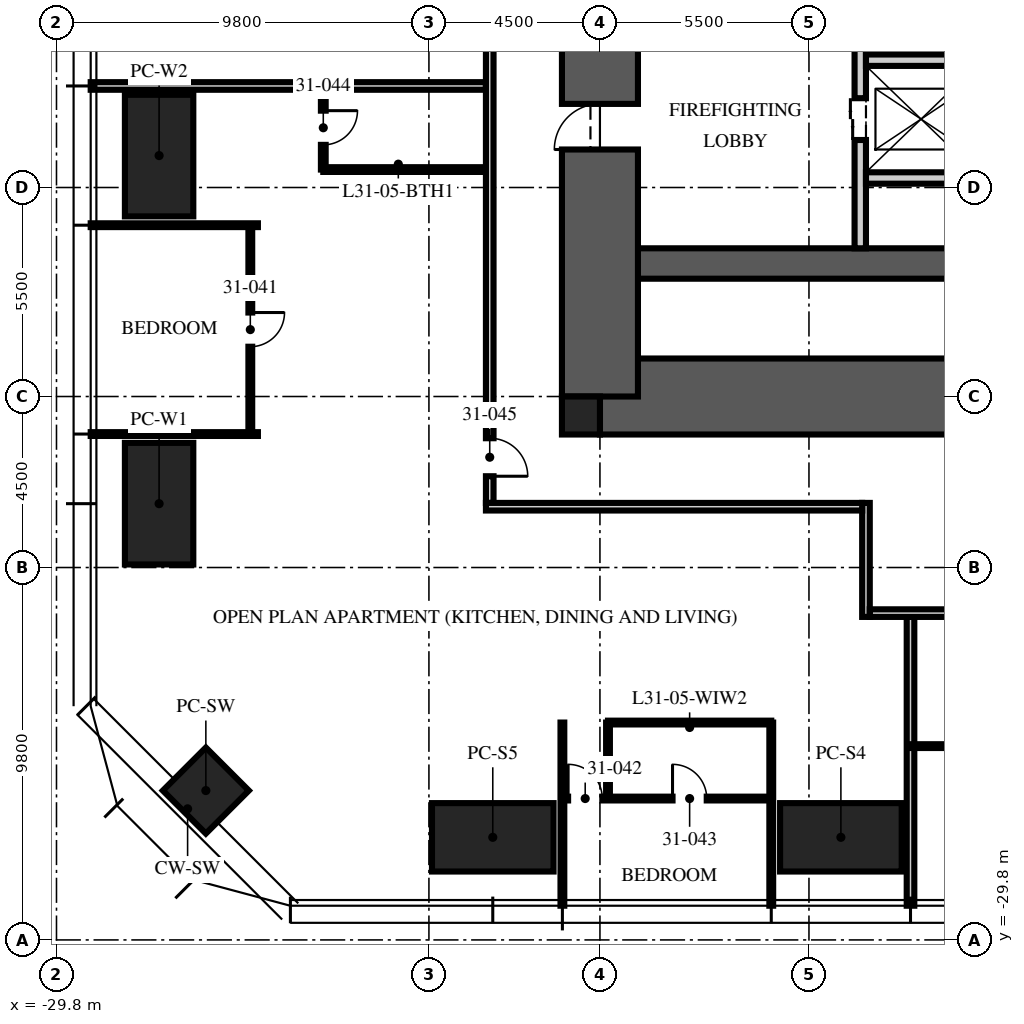
"""IFC4 building model, lengths in metres.
Left out: names, types, materials, properties, quantities, classifications, styles, units other than length and angle.
Written with IfcOpenShell. Run it as: python <this file> out.ifc"""

import sys

from ifc_helpers import new_model, si_unit, direction, frame, frame_2d, origin, origin_2d, place, context, subcontext, project, spatial, rectangle, extrude, element, fill, save


model = new_model("IFC4")
c1 = context("Model", 3, precision=1e-05, world=origin(), true_north=direction((0.0, 1.0)))
c2 = subcontext(c1, "Body", "Model", "MODEL_VIEW")
j1 = project(units=[si_unit("LENGTHUNIT", "METRE"), si_unit("PLANEANGLEUNIT", "RADIAN")], contexts=[c1])
p1 = place(None, origin())
s1 = spatial("IfcSite", under=j1, at=p1, CompositionType="ELEMENT")
p2 = place(p1, origin())
s2 = spatial("IfcBuilding", under=s1, at=p2, CompositionType="ELEMENT")
p3 = place(p2, frame((0.0, 0.0, 126.0)))
s3 = spatial("IfcBuildingStorey", under=s2, at=p3, CompositionType="ELEMENT", Elevation=126.0)
p4 = place(p3, frame((-15.5, -15.5, -0.25), z_axis=(0.0, 0.0, 1.0), x_axis=(1.0, 0.0, 0.0)))
e1 = element("IfcWall", 1, at=p4, inside=s3, PredefinedType="SHEAR", context=c2, shape_type="SweptSolid", body=[
    extrude(rectangle(XDim=31.0, YDim=2.0, at=frame_2d((15.5, 0.0))), origin(), (0.0, 0.0, 1.0), 3.75),
])
p5 = place(p4, frame((10.4, 0.0, 0.25)))
e2 = element("IfcOpeningElement", 2, at=p5, cuts=e1, PredefinedType="OPENING", context=c2, shape_type="SweptSolid", body=[
    extrude(rectangle(XDim=1.1, YDim=2.1, at=frame_2d((0.55, 1.05))), frame((0.0, 1.01, 0.0), z_axis=(0.0, -1.0, 0.0), x_axis=(1.0, 0.0, 0.0)), (0.0, 0.0, 1.0), 2.02),
])
p6 = place(p4, frame((13.5, 0.0, 0.25)))
e3 = element("IfcOpeningElement", 3, at=p6, cuts=e1, PredefinedType="OPENING", context=c2, shape_type="SweptSolid", body=[
    extrude(rectangle(XDim=1.1, YDim=2.1, at=frame_2d((0.55, 1.05))), frame((0.0, 1.01, 0.0), z_axis=(0.0, -1.0, 0.0), x_axis=(1.0, 0.0, 0.0)), (0.0, 0.0, 1.0), 2.02),
])
p7 = place(p4, frame((16.6, 0.0, 0.25)))
e4 = element("IfcOpeningElement", 4, at=p7, cuts=e1, PredefinedType="OPENING", context=c2, shape_type="SweptSolid", body=[
    extrude(rectangle(XDim=1.1, YDim=2.1, at=frame_2d((0.55, 1.05))), frame((0.0, 1.01, 0.0), z_axis=(0.0, -1.0, 0.0), x_axis=(1.0, 0.0, 0.0)), (0.0, 0.0, 1.0), 2.02),
])
p8 = place(p3, frame((-15.5, -12.0, -0.25), z_axis=(0.0, 0.0, 1.0), x_axis=(1.0, 0.0, 0.0)))
e5 = element("IfcWall", 5, at=p8, inside=s3, PredefinedType="SHEAR", context=c2, shape_type="SweptSolid", body=[
    extrude(rectangle(XDim=31.0, YDim=0.8, at=frame_2d((15.5, 0.0))), origin(), (0.0, 0.0, 1.0), 3.75),
])
p9 = place(p3, frame((-15.5, -15.5, -0.25), z_axis=(0.0, 0.0, 1.0), x_axis=(0.0, 1.0, 0.0)))
e6 = element("IfcWall", 6, at=p9, inside=s3, PredefinedType="SHEAR", context=c2, shape_type="SweptSolid", body=[
    extrude(rectangle(XDim=31.0, YDim=2.0, at=frame_2d((15.5, 0.0))), origin(), (0.0, 0.0, 1.0), 3.75),
])
p10 = place(p9, frame((6.5, 0.0, 0.25)))
e7 = element("IfcOpeningElement", 7, at=p10, cuts=e6, PredefinedType="OPENING", context=c2, shape_type="SweptSolid", body=[
    extrude(rectangle(XDim=1.2, YDim=2.1, at=frame_2d((0.6, 1.05))), frame((0.0, 1.01, 0.0), z_axis=(0.0, -1.0, 0.0), x_axis=(1.0, 0.0, 0.0)), (0.0, 0.0, 1.0), 2.02),
])
p11 = place(p9, frame((23.0, 0.0, 0.25)))
e8 = element("IfcOpeningElement", 8, at=p11, cuts=e6, PredefinedType="OPENING", context=c2, shape_type="SweptSolid", body=[
    extrude(rectangle(XDim=1.8, YDim=2.1, at=frame_2d((0.9, 1.05))), frame((0.0, 1.01, 0.0), z_axis=(0.0, -1.0, 0.0), x_axis=(1.0, 0.0, 0.0)), (0.0, 0.0, 1.0), 2.02),
])
p12 = place(p3, frame((-16.0, -16.0, -0.25), z_axis=(0.0, 0.0, 1.0), x_axis=(1.0, 0.0, 0.0)))
e9 = element("IfcColumn", 9, at=p12, inside=s3, PredefinedType="COLUMN", context=c2, shape_type="SweptSolid", body=[
    extrude(rectangle(XDim=1.0, YDim=1.0, at=origin_2d()), origin(), (0.0, 0.0, 1.0), 3.75),
])
for number, where, z_axis, x_axis in (
    (10, (-9.16, -27.1, 0.0), (0.0, 0.0, 1.0), (1.0, 0.0, 0.0)),
    (11, (-18.32, -27.1, 0.0), (0.0, 0.0, 1.0), (1.0, 0.0, 0.0)),
    (12, (-27.1, -18.32, 0.0), (0.0, 0.0, 1.0), (0.0, 1.0, 0.0)),
    (13, (-27.1, -9.16, 0.0), (0.0, 0.0, 1.0), (0.0, 1.0, 0.0)),
):
    element("IfcColumn", number, at=place(p3, frame(where, z_axis=z_axis, x_axis=x_axis)), inside=s3, PredefinedType="COLUMN", context=c2, shape_type="SweptSolid", body=[
        extrude(rectangle(XDim=3.2, YDim=1.8, at=origin_2d()), origin(), (0.0, 0.0, 1.0), 3.75),
    ])
p13 = place(p3, frame((-25.87, -25.87, 0.0), z_axis=(0.0, 0.0, 1.0), x_axis=(0.707106781187, -0.707106781187, 0.0)))
e14 = element("IfcColumn", 14, at=p13, inside=s3, PredefinedType="COLUMN", context=c2, shape_type="SweptSolid", body=[
    extrude(rectangle(XDim=1.6, YDim=1.6, at=origin_2d()), origin(), (0.0, 0.0, 1.0), 3.75),
])
p14 = place(p3, frame((-8.65, -11.6, 0.0), z_axis=(0.0, 0.0, 1.0), x_axis=(0.0, 1.0, 0.0)))
e15 = element("IfcWall", 15, at=p14, inside=s3, PredefinedType="PARTITIONING", context=c2, shape_type="SweptSolid", body=[
    extrude(rectangle(XDim=6.7, YDim=0.3, at=frame_2d((3.35, 0.0))), origin(), (0.0, 0.0, 1.0), 3.5),
])
p15 = place(p14, frame((2.85, 0.0, 0.0)))
e16 = element("IfcOpeningElement", 16, at=p15, cuts=e15, PredefinedType="OPENING", context=c2, shape_type="SweptSolid", body=[
    extrude(rectangle(XDim=1.1, YDim=2.1, at=frame_2d((0.55, 1.05))), frame((0.0, 0.16, 0.0), z_axis=(0.0, -1.0, 0.0), x_axis=(1.0, 0.0, 0.0)), (0.0, 0.0, 1.0), 0.32),
])
p16 = place(p3, frame((-8.5, -6.65, 0.0), z_axis=(0.0, 0.0, 1.0), x_axis=(1.0, 0.0, 0.0)))
e17 = element("IfcWall", 17, at=p16, inside=s3, PredefinedType="PARTITIONING", context=c2, shape_type="SweptSolid", body=[
    extrude(rectangle(XDim=17.0, YDim=0.3, at=frame_2d((8.5, 0.0))), origin(), (0.0, 0.0, 1.0), 3.5),
])
p17 = place(p16, frame((7.8, 0.0, 0.0)))
e18 = element("IfcOpeningElement", 18, at=p17, cuts=e17, PredefinedType="OPENING", context=c2, shape_type="SweptSolid", body=[
    extrude(rectangle(XDim=1.3, YDim=2.4, at=frame_2d((0.65, 1.2))), frame((0.0, 0.16, 0.0), z_axis=(0.0, -1.0, 0.0), x_axis=(1.0, 0.0, 0.0)), (0.0, 0.0, 1.0), 0.32),
])
p18 = place(p16, frame((5.65, 0.0, 0.0)))
e19 = element("IfcOpeningElement", 19, at=p18, cuts=e17, PredefinedType="OPENING", context=c2, shape_type="SweptSolid", body=[
    extrude(rectangle(XDim=0.9, YDim=2.1, at=frame_2d((0.45, 1.05))), frame((0.0, 0.16, 0.0), z_axis=(0.0, -1.0, 0.0), x_axis=(1.0, 0.0, 0.0)), (0.0, 0.0, 1.0), 0.32),
])
p19 = place(p16, frame((10.4, 0.0, 0.0)))
e20 = element("IfcOpeningElement", 20, at=p19, cuts=e17, PredefinedType="OPENING", context=c2, shape_type="SweptSolid", body=[
    extrude(rectangle(XDim=0.9, YDim=2.1, at=frame_2d((0.45, 1.05))), frame((0.0, 0.16, 0.0), z_axis=(0.0, -1.0, 0.0), x_axis=(1.0, 0.0, 0.0)), (0.0, 0.0, 1.0), 0.32),
])
p20 = place(p3, frame((-8.5, -9.75, 0.0), z_axis=(0.0, 0.0, 1.0), x_axis=(1.0, 0.0, 0.0)))
e21 = element("IfcWall", 21, at=p20, inside=s3, PredefinedType="PARTITIONING", context=c2, shape_type="SweptSolid", body=[
    extrude(rectangle(XDim=2.9, YDim=0.3, at=frame_2d((1.45, 0.0))), origin(), (0.0, 0.0, 1.0), 3.5),
])
p21 = place(p3, frame((-18.5, -7.328, 0.0), z_axis=(0.0, 0.0, 1.0), x_axis=(-1.0, 0.0, 0.0)))
e22 = element("IfcWall", 22, at=p21, inside=s3, PredefinedType="PARTITIONING", context=c2, shape_type="SweptSolid", body=[
    extrude(rectangle(XDim=10.4, YDim=0.2, at=frame_2d((5.2, 0.0))), origin(), (0.0, 0.0, 1.0), 2.81),
])
for number, where, z_axis, x_axis in (
    (23, (-24.5, -10.992, 0.0), (0.0, 0.0, 1.0), (-1.0, 0.0, 0.0)),
    (24, (-24.5, -16.488, 0.0), (0.0, 0.0, 1.0), (-1.0, 0.0, 0.0)),
):
    element("IfcWall", number, at=place(p3, frame(where, z_axis=z_axis, x_axis=x_axis)), inside=s3, PredefinedType="PARTITIONING", context=c2, shape_type="SweptSolid", body=[
        extrude(rectangle(XDim=4.4, YDim=0.1, at=frame_2d((2.2, 0.0))), origin(), (0.0, 0.0, 1.0), 2.81),
    ])
for number, where, z_axis, x_axis in (
    (25, (-16.488, -24.08, 0.0), (0.0, 0.0, 1.0), (0.0, -1.0, 0.0)),
    (26, (-10.992, -24.08, 0.0), (0.0, 0.0, 1.0), (0.0, -1.0, 0.0)),
):
    element("IfcWall", number, at=place(p3, frame(where, z_axis=z_axis, x_axis=x_axis)), inside=s3, PredefinedType="PARTITIONING", context=c2, shape_type="SweptSolid", body=[
        extrude(rectangle(XDim=4.82, YDim=0.1, at=frame_2d((2.41, 0.0))), origin(), (0.0, 0.0, 1.0), 2.81),
    ])
p22 = place(p3, frame((-7.328, -21.3, 0.0), z_axis=(0.0, 0.0, 1.0), x_axis=(0.0, -1.0, 0.0)))
e27 = element("IfcWall", 27, at=p22, inside=s3, PredefinedType="PARTITIONING", context=c2, shape_type="SweptSolid", body=[
    extrude(rectangle(XDim=7.6, YDim=0.2, at=frame_2d((3.8, 0.0))), origin(), (0.0, 0.0, 1.0), 2.81),
])
p23 = place(p3, frame((-24.7, -10.992, 0.0), z_axis=(0.0, 0.0, 1.0), x_axis=(0.0, -1.0, 0.0)))
e28 = element("IfcWall", 28, at=p23, inside=s3, PredefinedType="PARTITIONING", context=c2, shape_type="SweptSolid", body=[
    extrude(rectangle(XDim=5.496, YDim=0.1, at=frame_2d((2.748, 0.0))), origin(), (0.0, 0.0, 1.0), 2.81),
])
p24 = place(p23, frame((2.298, 0.0, 0.0)))
e29 = element("IfcOpeningElement", 29, at=p24, cuts=e28, PredefinedType="OPENING", context=c2, shape_type="SweptSolid", body=[
    extrude(rectangle(XDim=0.9, YDim=2.1, at=frame_2d((0.45, 1.05))), frame((0.0, 0.06, 0.0), z_axis=(0.0, -1.0, 0.0), x_axis=(1.0, 0.0, 0.0)), (0.0, 0.0, 1.0), 0.12),
])
p25 = place(p3, frame((-16.488, -26.08, 0.0), z_axis=(0.0, 0.0, 1.0), x_axis=(1.0, 0.0, 0.0)))
e30 = element("IfcWall", 30, at=p25, inside=s3, PredefinedType="PARTITIONING", context=c2, shape_type="SweptSolid", body=[
    extrude(rectangle(XDim=5.496, YDim=0.1, at=frame_2d((2.748, 0.0))), origin(), (0.0, 0.0, 1.0), 2.81),
])
p26 = place(p25, frame((0.15, 0.0, 0.0)))
e31 = element("IfcOpeningElement", 31, at=p26, cuts=e30, PredefinedType="OPENING", context=c2, shape_type="SweptSolid", body=[
    extrude(rectangle(XDim=0.9, YDim=2.1, at=frame_2d((0.45, 1.05))), frame((0.0, 0.06, 0.0), z_axis=(0.0, -1.0, 0.0), x_axis=(1.0, 0.0, 0.0)), (0.0, 0.0, 1.0), 0.12),
])
p27 = place(p25, frame((2.898, 0.0, 0.0)))
e32 = element("IfcOpeningElement", 32, at=p27, cuts=e30, PredefinedType="OPENING", context=c2, shape_type="SweptSolid", body=[
    extrude(rectangle(XDim=0.9, YDim=2.1, at=frame_2d((0.45, 1.05))), frame((0.0, 0.06, 0.0), z_axis=(0.0, -1.0, 0.0), x_axis=(1.0, 0.0, 0.0)), (0.0, 0.0, 1.0), 0.12),
])
p28 = place(p3, frame((-15.288, -24.08, 0.0), z_axis=(0.0, 0.0, 1.0), x_axis=(0.0, -1.0, 0.0)))
e33 = element("IfcWall", 33, at=p28, inside=s3, PredefinedType="PARTITIONING", context=c2, shape_type="SweptSolid", body=[
    extrude(rectangle(XDim=2.0, YDim=0.1, at=frame_2d((1.0, 0.0))), origin(), (0.0, 0.0, 1.0), 3.5),
])
p29 = place(p3, frame((-15.288, -24.08, 0.0), z_axis=(0.0, 0.0, 1.0), x_axis=(1.0, 0.0, 0.0)))
e34 = element("IfcWall", 34, at=p29, inside=s3, PredefinedType="PARTITIONING", context=c2, shape_type="SweptSolid", body=[
    extrude(rectangle(XDim=4.296, YDim=0.1, at=frame_2d((2.148, 0.0))), origin(), (0.0, 0.0, 1.0), 2.81),
])
p30 = place(p3, frame((-22.78, -7.328, 0.0), z_axis=(0.0, 0.0, 1.0), x_axis=(0.0, -1.0, 0.0)))
e35 = element("IfcWall", 35, at=p30, inside=s3, PredefinedType="PARTITIONING", context=c2, shape_type="SweptSolid", body=[
    extrude(rectangle(XDim=2.2, YDim=0.125, at=frame_2d((1.1, 0.0))), origin(), (0.0, 0.0, 1.0), 2.7),
])
p31 = place(p30, frame((0.65, 0.0, 0.0)))
e36 = element("IfcOpeningElement", 36, at=p31, cuts=e35, PredefinedType="OPENING", context=c2, shape_type="SweptSolid", body=[
    extrude(rectangle(XDim=0.9, YDim=2.1, at=frame_2d((0.45, 1.05))), frame((0.0, 0.073, 0.0), z_axis=(0.0, -1.0, 0.0), x_axis=(1.0, 0.0, 0.0)), (0.0, 0.0, 1.0), 0.145),
])
p32 = place(p3, frame((-18.5, -9.528, 0.0), z_axis=(0.0, 0.0, 1.0), x_axis=(-1.0, 0.0, 0.0)))
e37 = element("IfcWall", 37, at=p32, inside=s3, PredefinedType="PARTITIONING", context=c2, shape_type="SweptSolid", body=[
    extrude(rectangle(XDim=4.28, YDim=0.125, at=frame_2d((2.14, 0.0))), origin(), (0.0, 0.0, 1.0), 3.5),
])
p33 = place(p3, frame((-7.328, -24.7, 0.0), z_axis=(0.0, 0.0, 1.0), x_axis=(1.0, 0.0, 0.0)))
e38 = element("IfcWall", 38, at=p33, inside=s3, PredefinedType="PARTITIONING", context=c2, shape_type="SweptSolid", body=[
    extrude(rectangle(XDim=5.496, YDim=0.1, at=frame_2d((2.748, 0.0))), origin(), (0.0, 0.0, 1.0), 2.81),
])
p34 = place(p33, frame((2.298, 0.0, 0.0)))
e39 = element("IfcOpeningElement", 39, at=p34, cuts=e38, PredefinedType="OPENING", context=c2, shape_type="SweptSolid", body=[
    extrude(rectangle(XDim=0.9, YDim=2.1, at=frame_2d((0.45, 1.05))), frame((0.0, 0.06, 0.0), z_axis=(0.0, -1.0, 0.0), x_axis=(1.0, 0.0, 0.0)), (0.0, 0.0, 1.0), 0.12),
])
p35 = place(p3, frame((-18.4, 5.328, 0.0), z_axis=(0.0, 0.0, 1.0), x_axis=(0.0, -1.0, 0.0)))
e40 = element("IfcWall", 40, at=p35, inside=s3, PredefinedType="PARTITIONING", context=c2, shape_type="SweptSolid", body=[
    extrude(rectangle(XDim=23.628, YDim=0.2, at=frame_2d((11.814, 0.0))), origin(), (0.0, 0.0, 1.0), 2.3),
])
p36 = place(p35, frame((21.926, 0.0, 0.0)))
e41 = element("IfcOpeningElement", 41, at=p36, cuts=e40, PredefinedType="OPENING", context=c2, shape_type="SweptSolid", body=[
    extrude(rectangle(XDim=1.0, YDim=2.2, at=frame_2d((0.5, 1.1))), frame((0.0, 0.11, 0.0), z_axis=(0.0, -1.0, 0.0), x_axis=(1.0, 0.0, 0.0)), (0.0, 0.0, 1.0), 0.22),
])
p37 = place(p3, frame((-8.5, -18.3, 0.0), z_axis=(0.0, 0.0, 1.0), x_axis=(0.0, -1.0, 0.0)))
e42 = element("IfcWall", 42, at=p37, inside=s3, PredefinedType="PARTITIONING", context=c2, shape_type="SweptSolid", body=[
    extrude(rectangle(XDim=3.0, YDim=0.2, at=frame_2d((1.5, 0.0))), origin(), (0.0, 0.0, 1.0), 3.5),
])
p38 = place(p3, frame((5.4, -21.2, 0.0), z_axis=(0.0, 0.0, 1.0), x_axis=(-1.0, 0.0, 0.0)))
e43 = element("IfcWall", 43, at=p38, inside=s3, PredefinedType="PARTITIONING", context=c2, shape_type="SweptSolid", body=[
    extrude(rectangle(XDim=13.8, YDim=0.2, at=frame_2d((6.9, 0.0))), origin(), (0.0, 0.0, 1.0), 2.7),
])
p39 = place(p38, frame((0.958, 0.0, 0.0)))
e44 = element("IfcOpeningElement", 44, at=p39, cuts=e43, PredefinedType="OPENING", context=c2, shape_type="SweptSolid", body=[
    extrude(rectangle(XDim=1.0, YDim=2.2, at=frame_2d((0.5, 1.1))), frame((0.0, 0.11, 0.0), z_axis=(0.0, -1.0, 0.0), x_axis=(1.0, 0.0, 0.0)), (0.0, 0.0, 1.0), 0.22),
])
p40 = place(p3, frame((-8.6, -18.4, 0.0), z_axis=(0.0, 0.0, 1.0), x_axis=(-1.0, 0.0, 0.0)))
e45 = element("IfcWall", 45, at=p40, inside=s3, PredefinedType="PARTITIONING", context=c2, shape_type="SweptSolid", body=[
    extrude(rectangle(XDim=9.9, YDim=0.2, at=frame_2d((4.95, 0.0))), origin(), (0.0, 0.0, 1.0), 2.3),
])
p41 = place(p10, origin())
e46 = element("IfcDoor", 46, at=p41, inside=s3, OperationType="SINGLE_SWING_LEFT", PredefinedType="DOOR", context=c2, shape_type="SweptSolid", body=[
    extrude(rectangle(XDim=1.2, YDim=2.1, at=frame_2d((0.6, 1.05))), frame((0.0, 0.025, 0.0), z_axis=(0.0, -1.0, 0.0), x_axis=(1.0, 0.0, 0.0)), (0.0, 0.0, 1.0), 0.05),
])
fill(e7, e46)
p42 = place(p15, origin())
e47 = element("IfcDoor", 47, at=p42, inside=s3, OperationType="DOUBLE_DOOR_SLIDING", PredefinedType="DOOR", context=c2, shape_type="SweptSolid", body=[
    extrude(rectangle(XDim=1.1, YDim=2.1, at=frame_2d((0.55, 1.05))), frame((0.0, 0.025, 0.0), z_axis=(0.0, -1.0, 0.0), x_axis=(1.0, 0.0, 0.0)), (0.0, 0.0, 1.0), 0.05),
])
fill(e16, e47)
p43 = place(p24, origin())
e48 = element("IfcDoor", 48, at=p43, inside=s3, OperationType="SINGLE_SWING_LEFT", PredefinedType="DOOR", context=c2, shape_type="SweptSolid", body=[
    extrude(rectangle(XDim=0.9, YDim=2.1, at=frame_2d((0.45, 1.05))), frame((0.0, 0.025, 0.0), z_axis=(0.0, -1.0, 0.0), x_axis=(1.0, 0.0, 0.0)), (0.0, 0.0, 1.0), 0.05),
])
fill(e29, e48)
p44 = place(p26, origin())
e49 = element("IfcDoor", 49, at=p44, inside=s3, OperationType="SINGLE_SWING_LEFT", PredefinedType="DOOR", context=c2, shape_type="SweptSolid", body=[
    extrude(rectangle(XDim=0.9, YDim=2.1, at=frame_2d((0.45, 1.05))), frame((0.0, 0.025, 0.0), z_axis=(0.0, -1.0, 0.0), x_axis=(1.0, 0.0, 0.0)), (0.0, 0.0, 1.0), 0.05),
])
fill(e31, e49)
p45 = place(p27, origin())
e50 = element("IfcDoor", 50, at=p45, inside=s3, OperationType="SINGLE_SWING_LEFT", PredefinedType="DOOR", context=c2, shape_type="SweptSolid", body=[
    extrude(rectangle(XDim=0.9, YDim=2.1, at=frame_2d((0.45, 1.05))), frame((0.0, 0.025, 0.0), z_axis=(0.0, -1.0, 0.0), x_axis=(1.0, 0.0, 0.0)), (0.0, 0.0, 1.0), 0.05),
])
fill(e32, e50)
p46 = place(p31, origin())
e51 = element("IfcDoor", 51, at=p46, inside=s3, OperationType="SINGLE_SWING_LEFT", PredefinedType="DOOR", context=c2, shape_type="SweptSolid", body=[
    extrude(rectangle(XDim=0.9, YDim=2.1, at=frame_2d((0.45, 1.05))), frame((0.0, 0.025, 0.0), z_axis=(0.0, -1.0, 0.0), x_axis=(1.0, 0.0, 0.0)), (0.0, 0.0, 1.0), 0.05),
])
fill(e36, e51)
p47 = place(p36, origin())
e52 = element("IfcDoor", 52, at=p47, inside=s3, OperationType="SINGLE_SWING_RIGHT", PredefinedType="DOOR", context=c2, shape_type="SweptSolid", body=[
    extrude(rectangle(XDim=1.0, YDim=2.2, at=frame_2d((0.5, 1.1))), frame((0.0, 0.025, 0.0), z_axis=(0.0, -1.0, 0.0), x_axis=(1.0, 0.0, 0.0)), (0.0, 0.0, 1.0), 0.05),
])
fill(e41, e52)
save(model, sys.argv[1])
